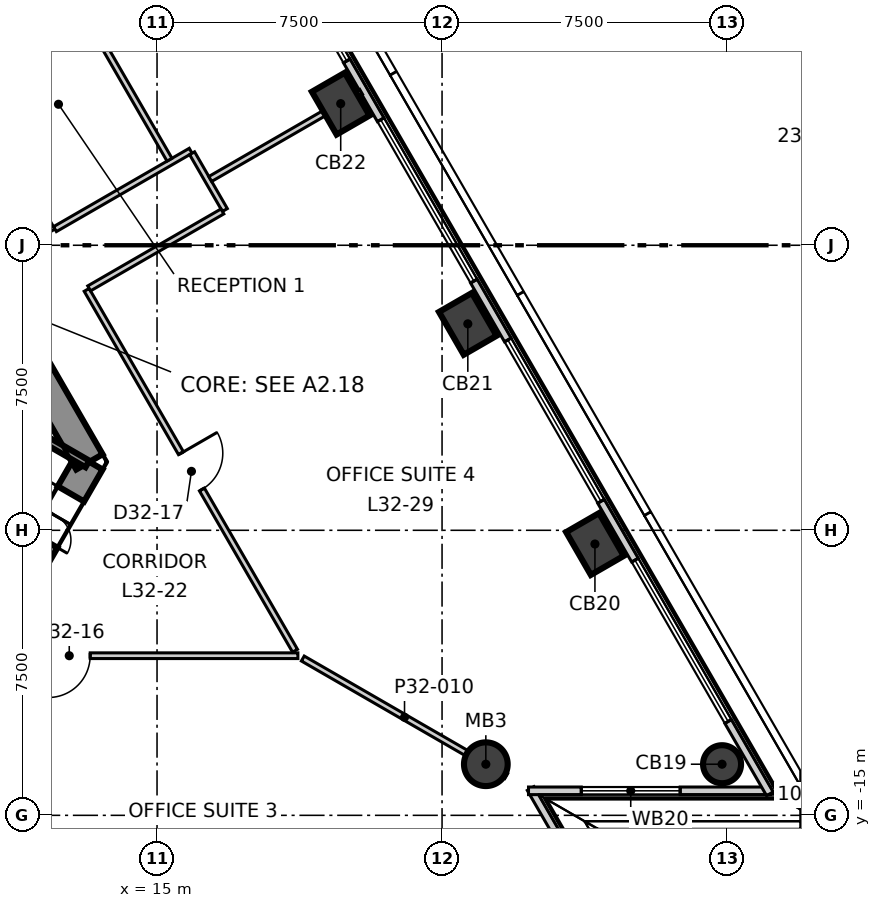
"""IFC4 building model, lengths in metres.
Left out: names, types, materials, properties, quantities, classifications, styles, units other than length and angle.
Written with IfcOpenShell. Run it as: python <this file> out.ifc"""

import sys

from ifc_helpers import new_model, si_unit, direction, frame, frame_2d, origin, origin_2d, place, context, subcontext, project, spatial, polyline, rectangle, circle, outline, extrude, element, fill, save


model = new_model("IFC4")
c1 = context("Model", 3, precision=1e-05, world=origin(), true_north=direction((0.0, 1.0)))
c2 = subcontext(c1, "Body", "Model", "MODEL_VIEW")
j1 = project(units=[si_unit("LENGTHUNIT", "METRE"), si_unit("PLANEANGLEUNIT", "RADIAN")], contexts=[c1])
p1 = place(None, origin())
s1 = spatial("IfcSite", under=j1, at=p1, CompositionType="ELEMENT")
p2 = place(p1, origin())
s2 = spatial("IfcBuilding", under=s1, at=p2, CompositionType="ELEMENT")
p3 = place(p2, frame((0.0, 0.0, 140.3)))
s3 = spatial("IfcBuildingStorey", under=s2, at=p3, CompositionType="ELEMENT", Elevation=140.3)
p4 = place(p3, frame((11.547, -8.6, -0.3), z_axis=(0.0, 0.0, 1.0), x_axis=(0.49987182685, 0.866099391942, 0.0)))
e1 = element("IfcWall", 1, at=p4, inside=s3, PredefinedType="SHEAR", context=c2, shape_type="SweptSolid", body=[
    extrude(outline(polyline([(-0.231, -0.4), (1.674, -0.4), (3.579, -0.4), (3.118, 0.4), (1.674, 0.4), (0.231, 0.4), (-0.231, -0.4)])), origin(), (0.0, 0.0, 1.0), 4.0),
])
p5 = place(p4, frame((0.974, 0.0, 0.3)))
e2 = element("IfcOpeningElement", 2, at=p5, cuts=e1, PredefinedType="OPENING", context=c2, shape_type="SweptSolid", body=[
    extrude(rectangle(XDim=1.4, YDim=2.1, at=frame_2d((0.7, 1.05))), frame((0.0, 0.41, 0.0), z_axis=(0.0, -1.0, 0.0), x_axis=(1.0, 0.0, 0.0)), (0.0, 0.0, 1.0), 0.82),
])
p6 = place(p3, frame((13.221, -5.7, -0.3), z_axis=(0.0, 0.0, 1.0), x_axis=(-0.499995765644, 0.866027848477, 0.0)))
e3 = element("IfcWall", 3, at=p6, inside=s3, PredefinedType="SHEAR", context=c2, shape_type="SweptSolid", body=[
    extrude(outline(polyline([(-0.231, -0.4), (1.732, -0.4), (3.695, -0.4), (5.658, -0.4), (7.621, -0.4), (9.584, -0.4), (11.547, -0.4), (13.51, -0.4), (15.473, -0.4), (17.436, -0.4), (19.399, -0.4), (21.362, -0.4), (23.325, -0.4), (22.863, 0.4), (20.977, 0.4), (19.091, 0.4), (17.205, 0.4), (15.319, 0.4), (13.433, 0.4), (11.547, 0.4), (9.661, 0.4), (7.775, 0.4), (5.889, 0.4), (4.003, 0.4), (2.117, 0.4), (0.231, 0.4), (-0.231, -0.4)])), origin(), (0.0, 0.0, 1.0), 4.0),
])
p7 = place(p6, frame((10.647, 0.0, 0.3)))
e4 = element("IfcOpeningElement", 4, at=p7, cuts=e3, PredefinedType="OPENING", context=c2, shape_type="SweptSolid", body=[
    extrude(rectangle(XDim=1.8, YDim=2.1, at=frame_2d((0.9, 1.05))), frame((0.0, 0.41, 0.0), z_axis=(0.0, -1.0, 0.0), x_axis=(1.0, 0.0, 0.0)), (0.0, 0.0, 1.0), 0.82),
])
p8 = place(p6, frame((17.721, 0.0, 0.3)))
e5 = element("IfcOpeningElement", 5, at=p8, cuts=e3, PredefinedType="OPENING", context=c2, shape_type="SweptSolid", body=[
    extrude(rectangle(XDim=0.9, YDim=2.1, at=frame_2d((0.45, 1.05))), frame((0.0, 0.41, 0.0), z_axis=(0.0, -1.0, 0.0), x_axis=(1.0, 0.0, 0.0)), (0.0, 0.0, 1.0), 0.82),
])
p9 = place(p3, frame((29.868, -13.655, -0.3), z_axis=(0.0, 0.0, 1.0), x_axis=(-0.5, 0.866025403784, 0.0)))
e6 = element("IfcColumn", 6, at=p9, inside=s3, PredefinedType="COLUMN", context=c2, shape_type="SweptSolid", body=[
    extrude(circle(Radius=0.5, at=origin_2d()), origin(), (0.0, 0.0, 1.0), 4.0),
])
for number, where, z_axis, x_axis in (
    (7, (26.523, -7.861, -0.3), (0.0, 0.0, 1.0), (-0.5, 0.866, 0.0)),
    (8, (23.178, -2.068, -0.3), (0.0, 0.0, 1.0), (-0.5, 0.866, 0.0)),
    (9, (19.833, 3.726, -0.3), (0.0, 0.0, 1.0), (-0.5, 0.866, 0.0)),
):
    element("IfcColumn", number, at=place(p3, frame(where, z_axis=z_axis, x_axis=x_axis)), inside=s3, PredefinedType="COLUMN", context=c2, shape_type="SweptSolid", body=[
        extrude(rectangle(XDim=1.3, YDim=1.0, at=origin_2d()), origin(), (0.0, 0.0, 1.0), 4.0),
    ])
p10 = place(p3, frame((23.652, -13.655, -0.3), z_axis=(0.0, 0.0, 1.0), x_axis=(1.0, 0.0, 0.0)))
e10 = element("IfcColumn", 10, at=p10, inside=s3, PredefinedType="COLUMN", context=c2, shape_type="SweptSolid", body=[
    extrude(circle(Radius=0.575, at=origin_2d()), origin(), (0.0, 0.0, 1.0), 4.0),
])
p11 = place(p3, frame((28.018, -19.817, 0.0), z_axis=(0.0, 0.0, 1.0), x_axis=(-0.499919089554, 0.866072112413, 0.0)))
e11 = element("IfcWall", 11, at=p11, inside=s3, PredefinedType="ELEMENTEDWALL", context=c2, shape_type="SweptSolid", body=[
    extrude(rectangle(XDim=6.377, YDim=0.2, at=frame_2d((3.188, 0.0))), origin(), (0.0, 0.0, 1.0), 3.7),
])
p12 = place(p11, frame((1.99, 0.0, 0.9)))
e12 = element("IfcOpeningElement", 12, at=p12, cuts=e11, PredefinedType="OPENING", context=c2, shape_type="SweptSolid", body=[
    extrude(rectangle(XDim=2.6, YDim=2.5, at=frame_2d((1.3, 1.25))), frame((0.0, 0.11, 0.0), z_axis=(0.0, -1.0, 0.0), x_axis=(1.0, 0.0, 0.0)), (0.0, 0.0, 1.0), 0.22),
])
p13 = place(p3, frame((24.775, -14.355, 0.0), z_axis=(0.0, 0.0, 1.0), x_axis=(1.0, 0.0, 0.0)))
e13 = element("IfcWall", 13, at=p13, inside=s3, PredefinedType="ELEMENTEDWALL", context=c2, shape_type="SweptSolid", body=[
    extrude(rectangle(XDim=6.376, YDim=0.2, at=frame_2d((3.188, 0.0))), origin(), (0.0, 0.0, 1.0), 3.7),
])
p14 = place(p13, frame((1.39, 0.0, 0.9)))
e14 = element("IfcOpeningElement", 14, at=p14, cuts=e13, PredefinedType="OPENING", context=c2, shape_type="SweptSolid", body=[
    extrude(rectangle(XDim=2.6, YDim=2.5, at=frame_2d((1.3, 1.25))), frame((0.0, 0.11, 0.0), z_axis=(0.0, -1.0, 0.0), x_axis=(1.0, 0.0, 0.0)), (0.0, 0.0, 1.0), 0.22),
])
p15 = place(p3, frame((31.126, -14.433, 0.0), z_axis=(0.0, 0.0, 1.0), x_axis=(-0.500008098571, 0.866020728022, 0.0)))
e15 = element("IfcWall", 15, at=p15, inside=s3, PredefinedType="ELEMENTEDWALL", context=c2, shape_type="SweptSolid", body=[
    extrude(rectangle(XDim=56.105, YDim=0.2, at=frame_2d((28.052, 0.0))), origin(), (0.0, 0.0, 1.0), 3.7),
])
p16 = place(p15, frame((2.198, 0.0, 0.9)))
e16 = element("IfcOpeningElement", 16, at=p16, cuts=e15, PredefinedType="OPENING", context=c2, shape_type="SweptSolid", body=[
    extrude(rectangle(XDim=4.9, YDim=2.5, at=frame_2d((2.45, 1.25))), frame((0.0, 0.11, 0.0), z_axis=(0.0, -1.0, 0.0), x_axis=(1.0, 0.0, 0.0)), (0.0, 0.0, 1.0), 0.22),
])
p17 = place(p15, frame((8.888, 0.0, 0.9)))
e17 = element("IfcOpeningElement", 17, at=p17, cuts=e15, PredefinedType="OPENING", context=c2, shape_type="SweptSolid", body=[
    extrude(rectangle(XDim=4.9, YDim=2.5, at=frame_2d((2.45, 1.25))), frame((0.0, 0.11, 0.0), z_axis=(0.0, -1.0, 0.0), x_axis=(1.0, 0.0, 0.0)), (0.0, 0.0, 1.0), 0.22),
])
p18 = place(p15, frame((15.578, 0.0, 0.9)))
e18 = element("IfcOpeningElement", 18, at=p18, cuts=e15, PredefinedType="OPENING", context=c2, shape_type="SweptSolid", body=[
    extrude(rectangle(XDim=4.9, YDim=2.5, at=frame_2d((2.45, 1.25))), frame((0.0, 0.11, 0.0), z_axis=(0.0, -1.0, 0.0), x_axis=(1.0, 0.0, 0.0)), (0.0, 0.0, 1.0), 0.22),
])
p19 = place(p15, frame((22.267, 0.0, 0.9)))
e19 = element("IfcOpeningElement", 19, at=p19, cuts=e15, PredefinedType="OPENING", context=c2, shape_type="SweptSolid", body=[
    extrude(rectangle(XDim=4.9, YDim=2.5, at=frame_2d((2.45, 1.25))), frame((0.0, 0.11, 0.0), z_axis=(0.0, -1.0, 0.0), x_axis=(1.0, 0.0, 0.0)), (0.0, 0.0, 1.0), 0.22),
])
p20 = place(p15, frame((28.957, 0.0, 0.9)))
e20 = element("IfcOpeningElement", 20, at=p20, cuts=e15, PredefinedType="OPENING", context=c2, shape_type="SweptSolid", body=[
    extrude(rectangle(XDim=4.9, YDim=2.5, at=frame_2d((2.45, 1.25))), frame((0.0, 0.11, 0.0), z_axis=(0.0, -1.0, 0.0), x_axis=(1.0, 0.0, 0.0)), (0.0, 0.0, 1.0), 0.22),
])
p21 = place(p15, frame((35.647, 0.0, 0.9)))
e21 = element("IfcOpeningElement", 21, at=p21, cuts=e15, PredefinedType="OPENING", context=c2, shape_type="SweptSolid", body=[
    extrude(rectangle(XDim=4.9, YDim=2.5, at=frame_2d((2.45, 1.25))), frame((0.0, 0.11, 0.0), z_axis=(0.0, -1.0, 0.0), x_axis=(1.0, 0.0, 0.0)), (0.0, 0.0, 1.0), 0.22),
])
p22 = place(p15, frame((42.337, 0.0, 0.9)))
e22 = element("IfcOpeningElement", 22, at=p22, cuts=e15, PredefinedType="OPENING", context=c2, shape_type="SweptSolid", body=[
    extrude(rectangle(XDim=4.9, YDim=2.5, at=frame_2d((2.45, 1.25))), frame((0.0, 0.11, 0.0), z_axis=(0.0, -1.0, 0.0), x_axis=(1.0, 0.0, 0.0)), (0.0, 0.0, 1.0), 0.22),
])
p23 = place(p15, frame((49.027, 0.0, 0.9)))
e23 = element("IfcOpeningElement", 23, at=p23, cuts=e15, PredefinedType="OPENING", context=c2, shape_type="SweptSolid", body=[
    extrude(rectangle(XDim=4.9, YDim=2.5, at=frame_2d((2.45, 1.25))), frame((0.0, 0.11, 0.0), z_axis=(0.0, -1.0, 0.0), x_axis=(1.0, 0.0, 0.0)), (0.0, 0.0, 1.0), 0.22),
])
p24 = place(p3, frame((-5.789, -10.8, 0.0), z_axis=(0.0, 0.0, 1.0), x_axis=(1.0, 0.0, 0.0)))
e24 = element("IfcWall", 24, at=p24, inside=s3, PredefinedType="PARTITIONING", context=c2, shape_type="SweptSolid", body=[
    extrude(rectangle(XDim=24.495, YDim=0.15, at=frame_2d((12.248, 0.0))), origin(), (0.0, 0.0, 1.0), 3.7),
])
p25 = place(p24, frame((10.049, 0.0, 0.0)))
e25 = element("IfcOpeningElement", 25, at=p25, cuts=e24, PredefinedType="OPENING", context=c2, shape_type="SweptSolid", body=[
    extrude(rectangle(XDim=1.1, YDim=2.1, at=frame_2d((0.55, 1.05))), frame((0.0, 0.085, 0.0), z_axis=(0.0, -1.0, 0.0), x_axis=(1.0, 0.0, 0.0)), (0.0, 0.0, 1.0), 0.17),
])
p26 = place(p24, frame((4.349, 0.0, 0.0)))
e26 = element("IfcOpeningElement", 26, at=p26, cuts=e24, PredefinedType="OPENING", context=c2, shape_type="SweptSolid", body=[
    extrude(rectangle(XDim=0.9, YDim=2.1, at=frame_2d((0.45, 1.05))), frame((0.0, 0.085, 0.0), z_axis=(0.0, -1.0, 0.0), x_axis=(1.0, 0.0, 0.0)), (0.0, 0.0, 1.0), 0.17),
])
p27 = place(p24, frame((7.149, 0.0, 0.0)))
e27 = element("IfcOpeningElement", 27, at=p27, cuts=e24, PredefinedType="OPENING", context=c2, shape_type="SweptSolid", body=[
    extrude(rectangle(XDim=1.0, YDim=2.1, at=frame_2d((0.5, 1.05))), frame((0.0, 0.085, 0.0), z_axis=(0.0, -1.0, 0.0), x_axis=(1.0, 0.0, 0.0)), (0.0, 0.0, 1.0), 0.17),
])
p28 = place(p24, frame((17.929, 0.0, 0.0)))
e28 = element("IfcOpeningElement", 28, at=p28, cuts=e24, PredefinedType="OPENING", context=c2, shape_type="SweptSolid", body=[
    extrude(rectangle(XDim=1.1, YDim=2.1, at=frame_2d((0.55, 1.05))), frame((0.0, 0.085, 0.0), z_axis=(0.0, -1.0, 0.0), x_axis=(1.0, 0.0, 0.0)), (0.0, 0.0, 1.0), 0.17),
])
p29 = place(p3, frame((18.836, -10.874, 0.0), z_axis=(0.0, 0.0, 1.0), x_axis=(0.865990889316, -0.500059776048, 0.0)))
e29 = element("IfcWall", 29, at=p29, inside=s3, PredefinedType="PARTITIONING", context=c2, shape_type="SweptSolid", body=[
    extrude(rectangle(XDim=6.181, YDim=0.15, at=frame_2d((3.091, 0.0))), origin(), (0.0, 0.0, 1.0), 3.15),
])
p30 = place(p3, frame((0.076, 21.468, 0.0), z_axis=(0.0, 0.0, 1.0), x_axis=(0.499999691263, -0.866025582034, 0.0)))
e30 = element("IfcWall", 30, at=p30, inside=s3, PredefinedType="PARTITIONING", context=c2, shape_type="SweptSolid", body=[
    extrude(rectangle(XDim=24.342, YDim=0.15, at=frame_2d((12.171, 0.0))), origin(), (0.0, 0.0, 1.0), 3.7),
])
p31 = place(p30, frame((17.594, 0.0, 0.0)))
e31 = element("IfcOpeningElement", 31, at=p31, cuts=e30, PredefinedType="OPENING", context=c2, shape_type="SweptSolid", body=[
    extrude(rectangle(XDim=1.1, YDim=2.1, at=frame_2d((0.55, 1.05))), frame((0.0, 0.085, 0.0), z_axis=(0.0, -1.0, 0.0), x_axis=(1.0, 0.0, 0.0)), (0.0, 0.0, 1.0), 0.17),
])
p32 = place(p30, frame((6.814, 0.0, 0.0)))
e32 = element("IfcOpeningElement", 32, at=p32, cuts=e30, PredefinedType="OPENING", context=c2, shape_type="SweptSolid", body=[
    extrude(rectangle(XDim=1.0, YDim=2.1, at=frame_2d((0.5, 1.05))), frame((0.0, 0.085, 0.0), z_axis=(0.0, -1.0, 0.0), x_axis=(1.0, 0.0, 0.0)), (0.0, 0.0, 1.0), 0.17),
])
p33 = place(p30, frame((10.214, 0.0, 0.0)))
e33 = element("IfcOpeningElement", 33, at=p33, cuts=e30, PredefinedType="OPENING", context=c2, shape_type="SweptSolid", body=[
    extrude(rectangle(XDim=0.9, YDim=2.1, at=frame_2d((0.45, 1.05))), frame((0.0, 0.085, 0.0), z_axis=(0.0, -1.0, 0.0), x_axis=(1.0, 0.0, 0.0)), (0.0, 0.0, 1.0), 0.17),
])
p34 = place(p30, frame((1.924, 0.0, 0.0)))
e34 = element("IfcOpeningElement", 34, at=p34, cuts=e30, PredefinedType="OPENING", context=c2, shape_type="SweptSolid", body=[
    extrude(rectangle(XDim=1.1, YDim=2.1, at=frame_2d((0.55, 1.05))), frame((0.0, 0.085, 0.0), z_axis=(0.0, -1.0, 0.0), x_axis=(1.0, 0.0, 0.0)), (0.0, 0.0, 1.0), 0.17),
])
p35 = place(p3, frame((13.148, -1.174, 0.0), z_axis=(0.0, 0.0, 1.0), x_axis=(0.500088017957, -0.865974580629, 0.0)))
e35 = element("IfcWall", 35, at=p35, inside=s3, PredefinedType="PARTITIONING", context=c2, shape_type="SweptSolid", body=[
    extrude(rectangle(XDim=10.964, YDim=0.15, at=frame_2d((5.482, 0.0))), origin(), (0.0, 0.0, 1.0), 3.7),
])
p36 = place(p35, frame((4.964, 0.0, 0.0)))
e36 = element("IfcOpeningElement", 36, at=p36, cuts=e35, PredefinedType="OPENING", context=c2, shape_type="SweptSolid", body=[
    extrude(rectangle(XDim=1.1, YDim=2.1, at=frame_2d((0.55, 1.05))), frame((0.0, 0.085, 0.0), z_axis=(0.0, -1.0, 0.0), x_axis=(1.0, 0.0, 0.0)), (0.0, 0.0, 1.0), 0.17),
])
p37 = place(p3, frame((12.314, 0.424, 0.0), z_axis=(0.0, 0.0, 1.0), x_axis=(0.865997263264, 0.500048737644, 0.0)))
e37 = element("IfcWall", 37, at=p37, inside=s3, PredefinedType="PARTITIONING", context=c2, shape_type="SweptSolid", body=[
    extrude(rectangle(XDim=4.124, YDim=0.15, at=frame_2d((2.062, 0.0))), origin(), (0.0, 0.0, 1.0), 3.7),
])
p38 = place(p3, frame((15.923, 2.421, 0.0), z_axis=(0.0, 0.0, 1.0), x_axis=(0.499702028684, -0.866197369269, 0.0)))
e38 = element("IfcWall", 38, at=p38, inside=s3, PredefinedType="PARTITIONING", context=c2, shape_type="SweptSolid", body=[
    extrude(rectangle(XDim=1.725, YDim=0.15, at=frame_2d((0.862, 0.0))), origin(), (0.0, 0.0, 1.0), 3.7),
])
p39 = place(p3, frame((16.4, 1.744, 0.0), z_axis=(0.0, 0.0, 1.0), x_axis=(0.866045467449, 0.499965247104, 0.0)))
e39 = element("IfcWall", 39, at=p39, inside=s3, PredefinedType="PARTITIONING", context=c2, shape_type="SweptSolid", body=[
    extrude(rectangle(XDim=4.584, YDim=0.15, at=frame_2d((2.292, 0.0))), origin(), (0.0, 0.0, 1.0), 3.7),
])
p40 = place(p3, frame((13.214, -1.135, 0.0), z_axis=(0.0, 0.0, 1.0), x_axis=(0.865940524948, 0.500146985649, 0.0)))
e40 = element("IfcWall", 40, at=p40, inside=s3, PredefinedType="PARTITIONING", context=c2, shape_type="SweptSolid", body=[
    extrude(rectangle(XDim=4.049, YDim=0.15, at=frame_2d((2.024, 0.0))), origin(), (0.0, 0.0, 1.0), 3.7),
])
p41 = place(p3, frame((9.163, 12.929, 0.0), z_axis=(0.0, 0.0, 1.0), x_axis=(0.499991554064, -0.866030279993, 0.0)))
e41 = element("IfcWall", 41, at=p41, inside=s3, PredefinedType="PARTITIONING", context=c2, shape_type="SweptSolid", body=[
    extrude(rectangle(XDim=12.33, YDim=0.15, at=frame_2d((6.165, 0.0))), origin(), (0.0, 0.0, 1.0), 3.7),
])
p42 = place(p41, frame((5.655, 0.0, 0.0)))
e42 = element("IfcOpeningElement", 42, at=p42, cuts=e41, PredefinedType="OPENING", context=c2, shape_type="SweptSolid", body=[
    extrude(rectangle(XDim=1.0, YDim=2.1, at=frame_2d((0.5, 1.05))), frame((0.0, 0.085, 0.0), z_axis=(0.0, -1.0, 0.0), x_axis=(1.0, 0.0, 0.0)), (0.0, 0.0, 1.0), 0.17),
])
p43 = place(p3, frame((6.529, -1.922, 0.0), z_axis=(0.0, 0.0, 1.0), x_axis=(0.866060938598, -0.499938446846, 0.0)))
e43 = element("IfcWall", 43, at=p43, inside=s3, PredefinedType="SOLIDWALL", context=c2, shape_type="SweptSolid", body=[
    extrude(rectangle(XDim=7.665, YDim=0.2, at=frame_2d((3.832, 0.0))), origin(), (0.0, 0.0, 1.0), 3.7),
])
p44 = place(p14, origin())
e44 = element("IfcWindow", 44, at=p44, inside=s3, PartitioningType="SINGLE_PANEL", PredefinedType="WINDOW", context=c2, shape_type="SweptSolid", body=[
    extrude(rectangle(XDim=2.6, YDim=2.5, at=frame_2d((1.3, 1.25))), frame((0.0, 0.03, 0.0), z_axis=(0.0, -1.0, 0.0), x_axis=(1.0, 0.0, 0.0)), (0.0, 0.0, 1.0), 0.06),
])
fill(e14, e44)
p45 = place(p16, origin())
e45 = element("IfcWindow", 45, at=p45, inside=s3, PartitioningType="SINGLE_PANEL", PredefinedType="WINDOW", context=c2, shape_type="SweptSolid", body=[
    extrude(rectangle(XDim=4.9, YDim=2.5, at=frame_2d((2.45, 1.25))), frame((0.0, 0.03, 0.0), z_axis=(0.0, -1.0, 0.0), x_axis=(1.0, 0.0, 0.0)), (0.0, 0.0, 1.0), 0.06),
])
fill(e16, e45)
p46 = place(p17, origin())
e46 = element("IfcWindow", 46, at=p46, inside=s3, PartitioningType="SINGLE_PANEL", PredefinedType="WINDOW", context=c2, shape_type="SweptSolid", body=[
    extrude(rectangle(XDim=4.9, YDim=2.5, at=frame_2d((2.45, 1.25))), frame((0.0, 0.03, 0.0), z_axis=(0.0, -1.0, 0.0), x_axis=(1.0, 0.0, 0.0)), (0.0, 0.0, 1.0), 0.06),
])
fill(e17, e46)
p47 = place(p18, origin())
e47 = element("IfcWindow", 47, at=p47, inside=s3, PartitioningType="SINGLE_PANEL", PredefinedType="WINDOW", context=c2, shape_type="SweptSolid", body=[
    extrude(rectangle(XDim=4.9, YDim=2.5, at=frame_2d((2.45, 1.25))), frame((0.0, 0.03, 0.0), z_axis=(0.0, -1.0, 0.0), x_axis=(1.0, 0.0, 0.0)), (0.0, 0.0, 1.0), 0.06),
])
fill(e18, e47)
p48 = place(p19, origin())
e48 = element("IfcWindow", 48, at=p48, inside=s3, PartitioningType="SINGLE_PANEL", PredefinedType="WINDOW", context=c2, shape_type="SweptSolid", body=[
    extrude(rectangle(XDim=4.9, YDim=2.5, at=frame_2d((2.45, 1.25))), frame((0.0, 0.03, 0.0), z_axis=(0.0, -1.0, 0.0), x_axis=(1.0, 0.0, 0.0)), (0.0, 0.0, 1.0), 0.06),
])
fill(e19, e48)
p49 = place(p28, origin())
e49 = element("IfcDoor", 49, at=p49, inside=s3, OperationType="SINGLE_SWING_LEFT", PredefinedType="DOOR", context=c2, shape_type="SweptSolid", body=[
    extrude(rectangle(XDim=1.1, YDim=2.1, at=frame_2d((0.55, 1.05))), frame((0.0, 0.025, 0.0), z_axis=(0.0, -1.0, 0.0), x_axis=(1.0, 0.0, 0.0)), (0.0, 0.0, 1.0), 0.05),
])
fill(e28, e49)
p50 = place(p36, origin())
e50 = element("IfcDoor", 50, at=p50, inside=s3, OperationType="SINGLE_SWING_RIGHT", PredefinedType="DOOR", context=c2, shape_type="SweptSolid", body=[
    extrude(rectangle(XDim=1.1, YDim=2.1, at=frame_2d((0.55, 1.05))), frame((0.0, 0.025, 0.0), z_axis=(0.0, -1.0, 0.0), x_axis=(1.0, 0.0, 0.0)), (0.0, 0.0, 1.0), 0.05),
])
fill(e36, e50)
p51 = place(p5, origin())
e51 = element("IfcDoor", 51, at=p51, inside=s3, OperationType="DOUBLE_DOOR_SINGLE_SWING", PredefinedType="DOOR", context=c2, shape_type="SweptSolid", body=[
    extrude(rectangle(XDim=1.4, YDim=2.1, at=frame_2d((0.7, 1.05))), frame((0.0, 0.025, 0.0), z_axis=(0.0, -1.0, 0.0), x_axis=(1.0, 0.0, 0.0)), (0.0, 0.0, 1.0), 0.05),
])
fill(e2, e51)
save(model, sys.argv[1])
